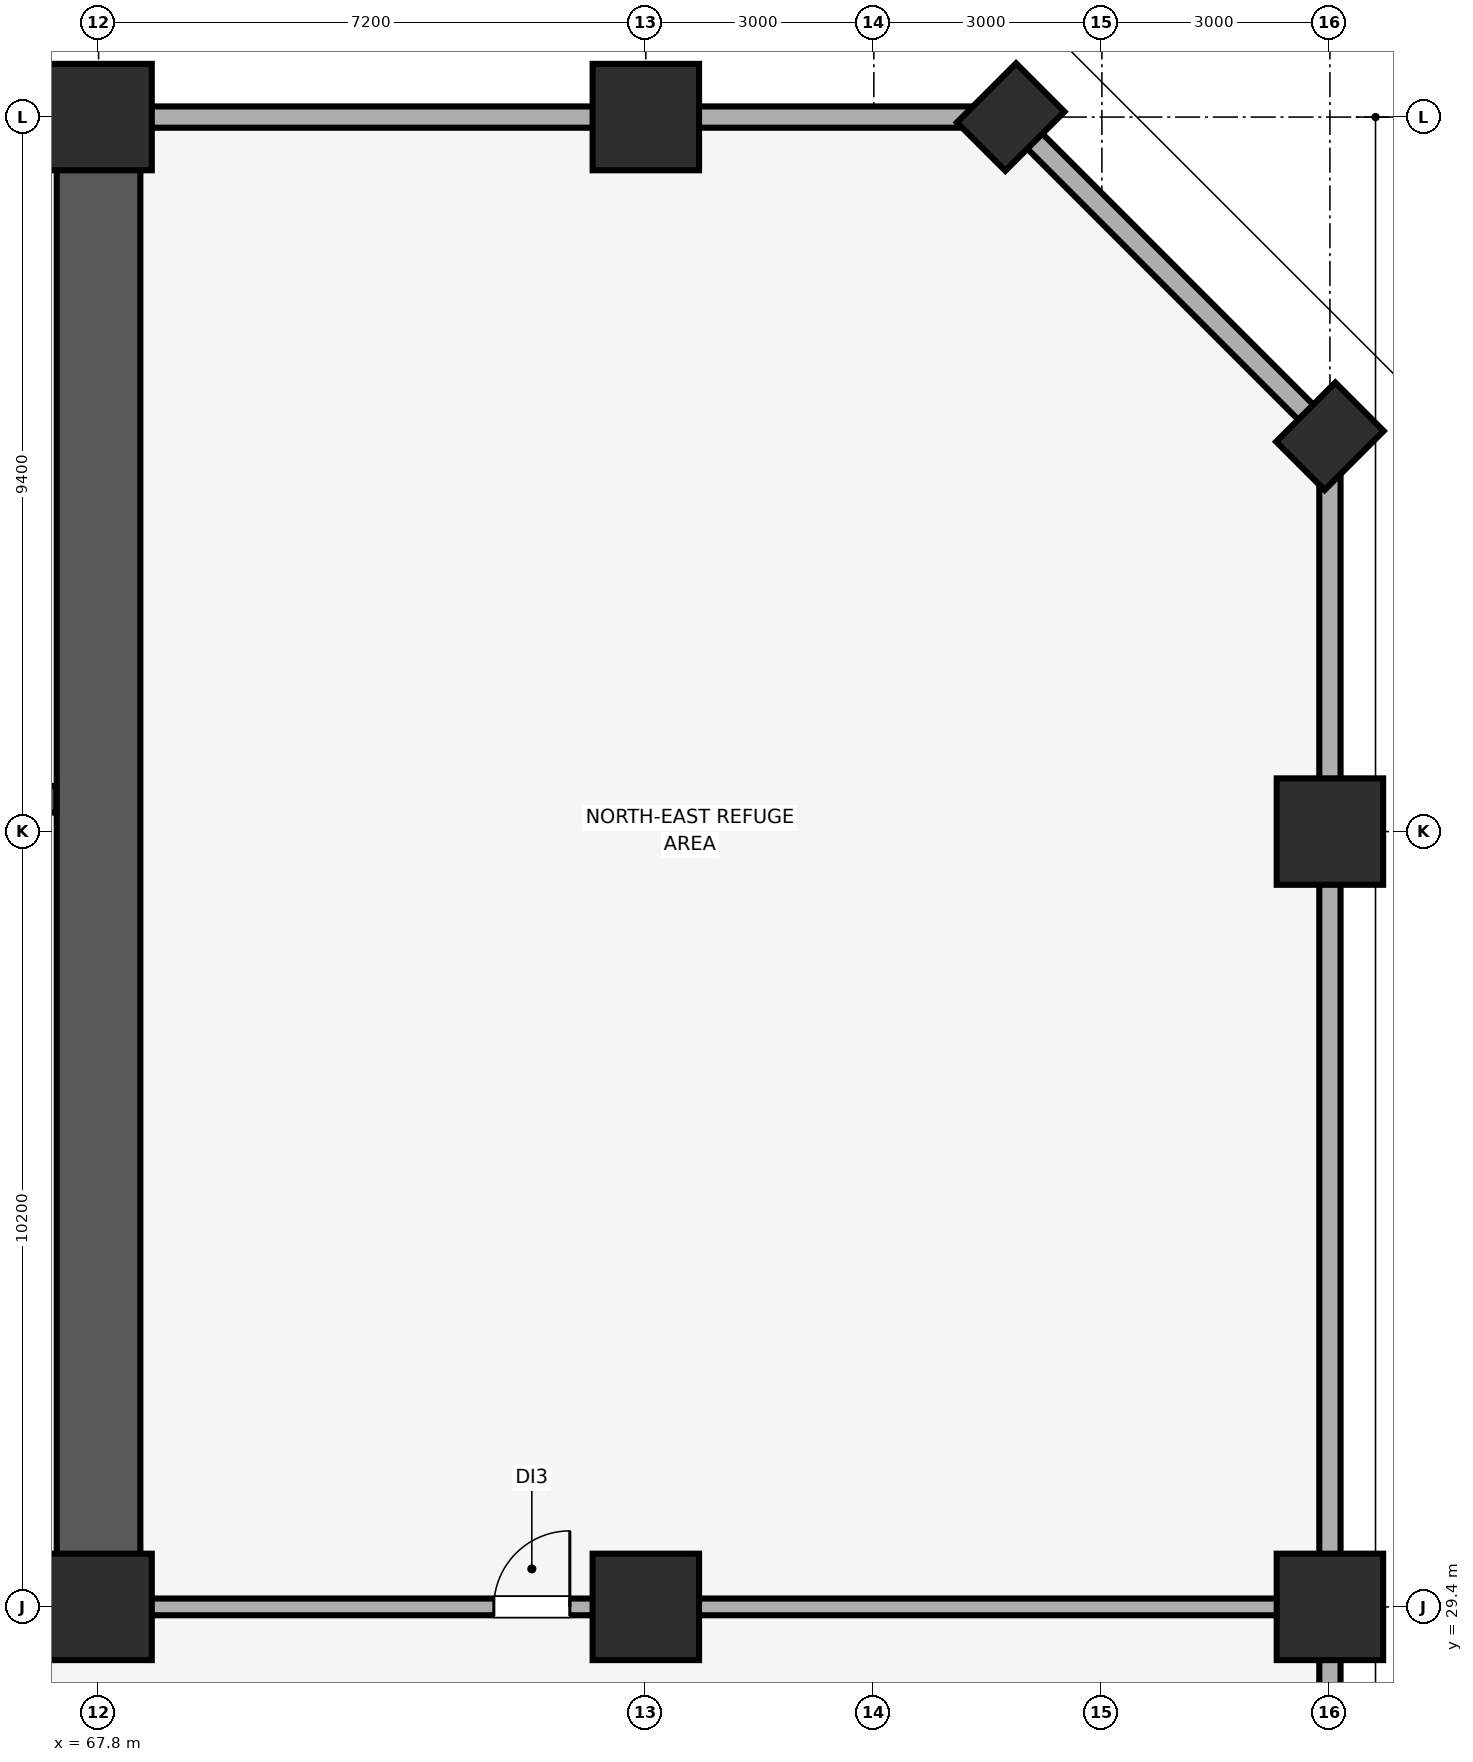
"""IFC4 building model, lengths in metres.
Left out: names, types, materials, properties, quantities, classifications, styles, units other than length and angle.
Written with IfcOpenShell. Run it as: python <this file> out.ifc"""

import sys

from ifc_helpers import new_model, si_unit, direction, frame, frame_2d, origin, origin_2d, place, context, subcontext, project, spatial, rectangle, extrude, element, fill, save


model = new_model("IFC4")
c1 = context("Model", 3, precision=1e-05, world=origin(), true_north=direction((0.0, 1.0)))
c2 = subcontext(c1, "Body", "Model", "MODEL_VIEW")
j1 = project(units=[si_unit("LENGTHUNIT", "METRE"), si_unit("PLANEANGLEUNIT", "RADIAN")], contexts=[c1])
p1 = place(None, origin())
s1 = spatial("IfcSite", under=j1, at=p1, CompositionType="ELEMENT")
p2 = place(p1, origin())
s2 = spatial("IfcBuilding", under=s1, at=p2, CompositionType="ELEMENT")
p3 = place(p2, frame((0.0, 0.0, 80.15)))
s3 = spatial("IfcBuildingStorey", under=s2, at=p3, CompositionType="ELEMENT", Elevation=80.15)
for number, where, z_axis, x_axis in (
    (1, (84.0, 29.4, 0.0), (0.0, 0.0, 1.0), (1.0, 0.0, 0.0)),
    (2, (84.0, 39.6, 0.0), (0.0, 0.0, 1.0), (1.0, 0.0, 0.0)),
):
    element("IfcColumn", number, at=place(p3, frame(where, z_axis=z_axis, x_axis=x_axis)), inside=s3, PredefinedType="COLUMN", context=c2, shape_type="SweptSolid", body=[
        extrude(rectangle(XDim=1.4, YDim=1.4, at=origin_2d()), origin(), (0.0, 0.0, 1.0), 5.16),
    ])
for number, where, z_axis, x_axis in (
    (3, (84.0, 44.8, 0.0), (0.0, 0.0, 1.0), (0.707, 0.707, 0.0)),
    (4, (79.8, 49.0, 0.0), (0.0, 0.0, 1.0), (0.707, 0.707, 0.0)),
):
    element("IfcColumn", number, at=place(p3, frame(where, z_axis=z_axis, x_axis=x_axis)), inside=s3, PredefinedType="PILASTER", context=c2, shape_type="SweptSolid", body=[
        extrude(rectangle(XDim=1.1, YDim=0.9, at=origin_2d()), origin(), (0.0, 0.0, 1.0), 5.16),
    ])
for number, where, z_axis, x_axis in (
    (5, (67.8, 29.4, 0.0), (0.0, 0.0, 1.0), (1.0, 0.0, 0.0)),
    (6, (67.8, 49.0, 0.0), (0.0, 0.0, 1.0), (1.0, 0.0, 0.0)),
    (7, (75.0, 29.4, 0.0), (0.0, 0.0, 1.0), (1.0, 0.0, 0.0)),
    (8, (75.0, 49.0, 0.0), (0.0, 0.0, 1.0), (1.0, 0.0, 0.0)),
):
    element("IfcColumn", number, at=place(p3, frame(where, z_axis=z_axis, x_axis=x_axis)), inside=s3, PredefinedType="COLUMN", context=c2, shape_type="SweptSolid", body=[
        extrude(rectangle(XDim=1.4, YDim=1.4, at=origin_2d()), origin(), (0.0, 0.0, 1.0), 5.16),
    ])
p4 = place(p3, frame((84.0, 4.2, 0.0), z_axis=(0.0, 0.0, 1.0), x_axis=(0.0, 1.0, 0.0)))
e9 = element("IfcWall", 9, at=p4, inside=s3, PredefinedType="SOLIDWALL", context=c2, shape_type="SweptSolid", body=[
    extrude(rectangle(XDim=40.6, YDim=0.28, at=frame_2d((20.3, 0.0))), origin(), (0.0, 0.0, 1.0), 4.21),
])
p5 = place(p3, frame((84.0, 44.8, 0.0), z_axis=(0.0, 0.0, 1.0), x_axis=(-0.707106781187, 0.707106781187, 0.0)))
e10 = element("IfcWall", 10, at=p5, inside=s3, PredefinedType="SOLIDWALL", context=c2, shape_type="SweptSolid", body=[
    extrude(rectangle(XDim=5.94, YDim=0.28, at=frame_2d((2.97, 0.0))), origin(), (0.0, 0.0, 1.0), 4.21),
])
p6 = place(p3, frame((79.8, 49.0, 0.0), z_axis=(0.0, 0.0, 1.0), x_axis=(-1.0, 0.0, 0.0)))
e11 = element("IfcWall", 11, at=p6, inside=s3, PredefinedType="SOLIDWALL", context=c2, shape_type="SweptSolid", body=[
    extrude(rectangle(XDim=75.6, YDim=0.28, at=frame_2d((37.8, 0.0))), origin(), (0.0, 0.0, 1.0), 4.21),
])
p7 = place(p3, frame((67.8, 29.4, 0.0), z_axis=(0.0, 0.0, 1.0), x_axis=(0.0, 1.0, 0.0)))
e12 = element("IfcWall", 12, at=p7, inside=s3, PredefinedType="SHEAR", context=c2, shape_type="SweptSolid", body=[
    extrude(rectangle(XDim=19.2, YDim=1.1, at=frame_2d((9.6, 0.0))), origin(), (0.0, 0.0, 1.0), 5.16),
])
p8 = place(p3, frame((60.4, 29.4, 0.0), z_axis=(0.0, 0.0, 1.0), x_axis=(1.0, 0.0, 0.0)))
e13 = element("IfcWall", 13, at=p8, inside=s3, PredefinedType="SHEAR", context=c2, shape_type="SweptSolid", body=[
    extrude(rectangle(XDim=6.845, YDim=1.1, at=frame_2d((3.423, 0.0))), origin(), (0.0, 0.0, 1.0), 5.16),
])
p9 = place(p3, frame((63.145, 40.025, 0.0), z_axis=(0.0, 0.0, 1.0), x_axis=(1.0, 0.0, 0.0)))
e14 = element("IfcWall", 14, at=p9, inside=s3, PredefinedType="SHEAR", context=c2, shape_type="SweptSolid", body=[
    extrude(rectangle(XDim=4.1, YDim=0.35, at=frame_2d((2.05, 0.0))), origin(), (0.0, 0.0, 1.0), 5.16),
])
p10 = place(p9, frame((1.24, 0.0, 0.0)))
e15 = element("IfcOpeningElement", 15, at=p10, cuts=e14, PredefinedType="OPENING", context=c2, shape_type="SweptSolid", body=[
    extrude(rectangle(XDim=1.15, YDim=2.15, at=frame_2d((0.575, 1.075))), frame((0.0, 0.185, 0.0), z_axis=(0.0, -1.0, 0.0), x_axis=(1.0, 0.0, 0.0)), (0.0, 0.0, 1.0), 0.37),
])
p11 = place(p3, frame((68.355, 29.4, 0.0), z_axis=(0.0, 0.0, 1.0), x_axis=(1.0, 0.0, 0.0)))
e16 = element("IfcWall", 16, at=p11, inside=s3, PredefinedType="PARTITIONING", context=c2, shape_type="SweptSolid", body=[
    extrude(rectangle(XDim=15.495, YDim=0.22, at=frame_2d((7.748, 0.0))), origin(), (0.0, 0.0, 1.0), 4.51),
])
p12 = place(p11, frame((4.645, 0.0, 0.0)))
e17 = element("IfcOpeningElement", 17, at=p12, cuts=e16, PredefinedType="OPENING", context=c2, shape_type="SweptSolid", body=[
    extrude(rectangle(XDim=1.0, YDim=2.15, at=frame_2d((0.5, 1.075))), frame((0.0, 0.12, 0.0), z_axis=(0.0, -1.0, 0.0), x_axis=(1.0, 0.0, 0.0)), (0.0, 0.0, 1.0), 0.24),
])
p13 = place(p12, origin())
e18 = element("IfcDoor", 18, at=p13, inside=s3, OperationType="SINGLE_SWING_RIGHT", PredefinedType="DOOR", context=c2, shape_type="SweptSolid", body=[
    extrude(rectangle(XDim=1.0, YDim=2.15, at=frame_2d((0.5, 1.075))), frame((0.0, 0.025, 0.0), z_axis=(0.0, -1.0, 0.0), x_axis=(1.0, 0.0, 0.0)), (0.0, 0.0, 1.0), 0.05),
])
fill(e17, e18)
save(model, sys.argv[1])
